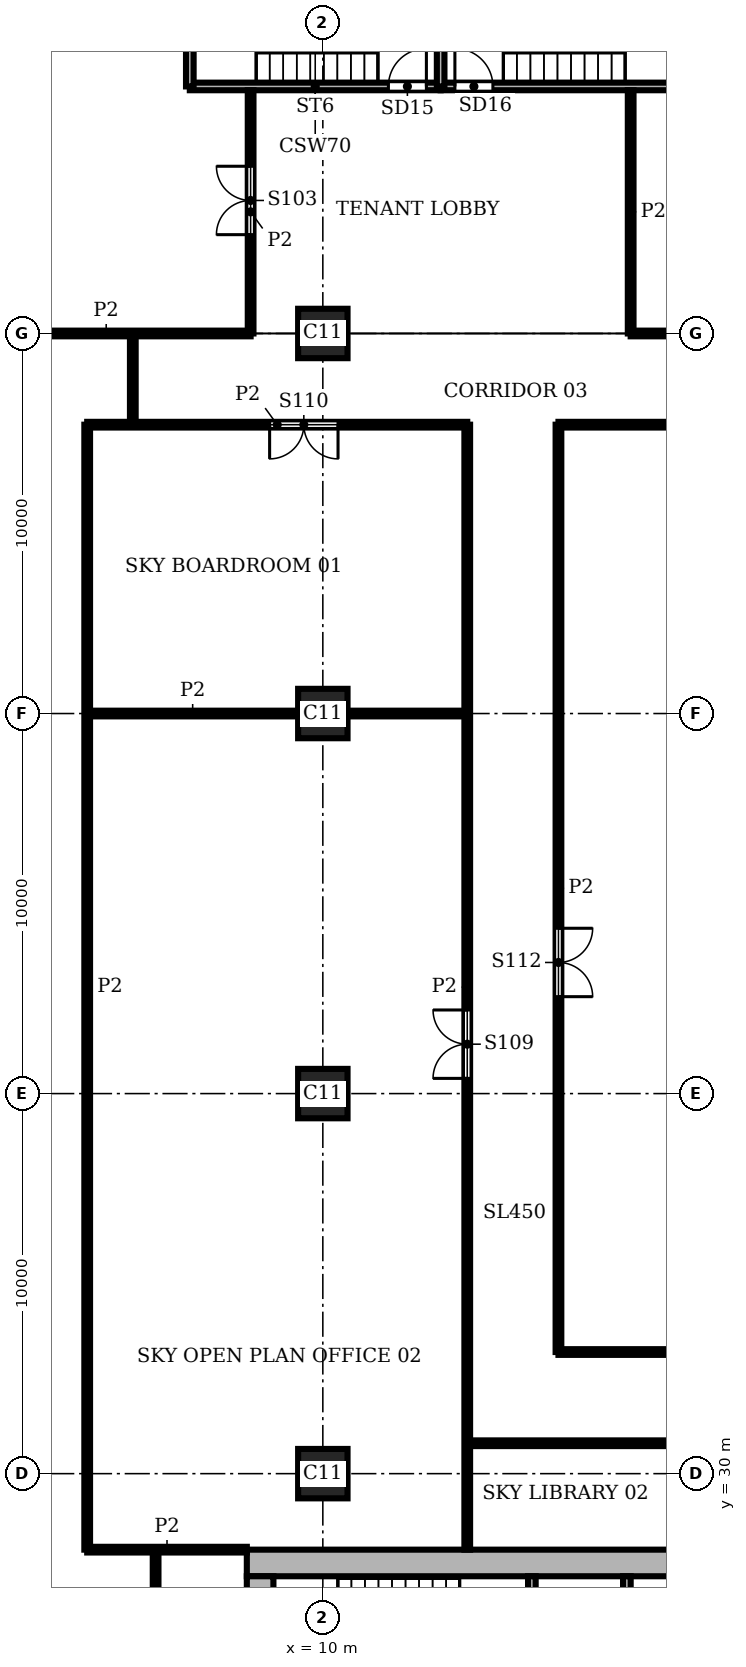
"""IFC4 building model, lengths in metres.
Left out: names, types, materials, properties, quantities, classifications, styles, units other than length and angle.
Written with IfcOpenShell. Run it as: python <this file> out.ifc"""

import sys

from ifc_helpers import new_model, si_unit, direction, frame, frame_2d, origin, origin_2d, place, context, subcontext, project, spatial, rectangle, extrude, element, fill, save


model = new_model("IFC4")
c1 = context("Model", 3, precision=1e-05, world=origin(), true_north=direction((0.0, 1.0)))
c2 = subcontext(c1, "Body", "Model", "MODEL_VIEW")
j1 = project(units=[si_unit("LENGTHUNIT", "METRE"), si_unit("PLANEANGLEUNIT", "RADIAN")], contexts=[c1])
p1 = place(None, origin())
s1 = spatial("IfcSite", under=j1, at=p1, CompositionType="ELEMENT")
p2 = place(p1, origin())
s2 = spatial("IfcBuilding", under=s1, at=p2, CompositionType="ELEMENT")
p3 = place(p2, frame((0.0, 0.0, 126.3)))
s3 = spatial("IfcBuildingStorey", under=s2, at=p3, CompositionType="ELEMENT", Elevation=126.3)
for number, where, z_axis, x_axis in (
    (1, (10.0, 30.0, 0.0), (0.0, 0.0, 1.0), (1.0, 0.0, 0.0)),
    (2, (10.0, 40.0, 0.0), (0.0, 0.0, 1.0), (1.0, 0.0, 0.0)),
    (3, (10.0, 50.0, 0.0), (0.0, 0.0, 1.0), (1.0, 0.0, 0.0)),
    (4, (10.0, 60.0, 0.0), (0.0, 0.0, 1.0), (1.0, 0.0, 0.0)),
):
    element("IfcColumn", number, at=place(p3, frame(where, z_axis=z_axis, x_axis=x_axis)), inside=s3, PredefinedType="COLUMN", context=c2, shape_type="SweptSolid", body=[
        extrude(rectangle(XDim=1.3, YDim=1.3, at=origin_2d()), origin(), (0.0, 0.0, 1.0), 5.4),
    ])
p4 = place(p3, frame((28.0, 27.65, 0.0), z_axis=(0.0, 0.0, 1.0), x_axis=(-1.0, 0.0, 0.0)))
e5 = element("IfcWall", 5, at=p4, inside=s3, PredefinedType="SHEAR", context=c2, shape_type="SweptSolid", body=[
    extrude(rectangle(XDim=20.0, YDim=0.7, at=frame_2d((10.0, 0.0))), origin(), (0.0, 0.0, 1.0), 5.4),
])
p5 = place(p3, frame((8.35, 27.3, 0.0), z_axis=(0.0, 0.0, 1.0), x_axis=(0.0, -1.0, 0.0)))
e6 = element("IfcWall", 6, at=p5, inside=s3, PredefinedType="SHEAR", context=c2, shape_type="SweptSolid", body=[
    extrude(rectangle(XDim=18.6, YDim=0.7, at=frame_2d((9.3, 0.0))), origin(), (0.0, 0.0, 1.0), 5.4),
])
p6 = place(p3, frame((3.284, 70.386, 0.0), z_axis=(0.0, 0.0, 1.0), x_axis=(-0.555541552266, -0.831488775454, 0.0)))
e7 = element("IfcWall", 7, at=p6, inside=s3, PredefinedType="SOLIDWALL", context=c2, shape_type="SweptSolid", body=[
    extrude(rectangle(XDim=4.753, YDim=0.4, at=frame_2d((2.376, 0.0))), origin(), (0.0, 0.0, 1.0), 5.4),
])
p7 = place(p6, frame((0.226, 0.0, 0.9)))
e8 = element("IfcOpeningElement", 8, at=p7, cuts=e7, PredefinedType="OPENING", context=c2, shape_type="SweptSolid", body=[
    extrude(rectangle(XDim=4.3, YDim=3.4, at=frame_2d((2.15, 1.7))), frame((0.0, 0.21, 0.0), z_axis=(0.0, -1.0, 0.0), x_axis=(1.0, 0.0, 0.0)), (0.0, 0.0, 1.0), 0.42),
])
p8 = place(p3, frame((6.5, 66.5, 0.0), z_axis=(0.0, 0.0, 1.0), x_axis=(1.0, 0.0, 0.0)))
e9 = element("IfcWall", 9, at=p8, inside=s3, PredefinedType="SHEAR", context=c2, shape_type="SweptSolid", body=[
    extrude(rectangle(XDim=6.6, YDim=0.2, at=frame_2d((3.3, 0.0))), origin(), (0.0, 0.0, 1.0), 5.08),
])
p9 = place(p8, frame((5.225, 0.0, 0.0)))
e10 = element("IfcOpeningElement", 10, at=p9, cuts=e9, PredefinedType="OPENING", context=c2, shape_type="SweptSolid", body=[
    extrude(rectangle(XDim=1.0, YDim=2.1, at=frame_2d((0.5, 1.05))), frame((0.0, 0.11, 0.0), z_axis=(0.0, -1.0, 0.0), x_axis=(1.0, 0.0, 0.0)), (0.0, 0.0, 1.0), 0.22),
])
p10 = place(p3, frame((13.1, 66.5, 0.0), z_axis=(0.0, 0.0, 1.0), x_axis=(1.0, 0.0, 0.0)))
e11 = element("IfcWall", 11, at=p10, inside=s3, PredefinedType="SHEAR", context=c2, shape_type="SweptSolid", body=[
    extrude(rectangle(XDim=6.6, YDim=0.2, at=frame_2d((3.3, 0.0))), origin(), (0.0, 0.0, 1.0), 5.08),
])
p11 = place(p10, frame((0.375, 0.0, 0.0)))
e12 = element("IfcOpeningElement", 12, at=p11, cuts=e11, PredefinedType="OPENING", context=c2, shape_type="SweptSolid", body=[
    extrude(rectangle(XDim=1.0, YDim=2.1, at=frame_2d((0.5, 1.05))), frame((0.0, 0.11, 0.0), z_axis=(0.0, -1.0, 0.0), x_axis=(1.0, 0.0, 0.0)), (0.0, 0.0, 1.0), 0.22),
])
for number, where, z_axis, x_axis in (
    (13, (6.5, 66.5, 0.0), (0.0, 0.0, 1.0), (0.0, 1.0, 0.0)),
    (14, (13.1, 66.5, 0.0), (0.0, 0.0, 1.0), (0.0, 1.0, 0.0)),
):
    element("IfcWall", number, at=place(p3, frame(where, z_axis=z_axis, x_axis=x_axis)), inside=s3, PredefinedType="SHEAR", context=c2, shape_type="SweptSolid", body=[
        extrude(rectangle(XDim=3.3, YDim=0.2, at=frame_2d((1.65, 0.0))), origin(), (0.0, 0.0, 1.0), 5.08),
    ])
p12 = place(p3, frame((15.5, 23.6, 0.0), z_axis=(0.0, 0.0, 1.0), x_axis=(0.0, 1.0, 0.0)))
e15 = element("IfcWall", 15, at=p12, inside=s3, PredefinedType="SHEAR", context=c2, shape_type="SweptSolid", body=[
    extrude(rectangle(XDim=3.7, YDim=0.2, at=frame_2d((1.85, 0.0))), origin(), (0.0, 0.0, 1.0), 5.08),
])
p13 = place(p3, frame((18.0, 20.0, 0.0), z_axis=(0.0, 0.0, 1.0), x_axis=(0.0, 1.0, 0.0)))
e16 = element("IfcWall", 16, at=p13, inside=s3, PredefinedType="SHEAR", context=c2, shape_type="SweptSolid", body=[
    extrude(rectangle(XDim=7.3, YDim=0.2, at=frame_2d((3.65, 0.0))), origin(), (0.0, 0.0, 1.0), 5.08),
])
p14 = place(p13, frame((1.2, 0.0, 0.0)))
e17 = element("IfcOpeningElement", 17, at=p14, cuts=e16, PredefinedType="OPENING", context=c2, shape_type="SweptSolid", body=[
    extrude(rectangle(XDim=1.2, YDim=2.1, at=frame_2d((0.6, 1.05))), frame((0.0, 0.11, 0.0), z_axis=(0.0, -1.0, 0.0), x_axis=(1.0, 0.0, 0.0)), (0.0, 0.0, 1.0), 0.22),
])
p15 = place(p3, frame((3.8, 28.0, 0.0), z_axis=(0.0, 0.0, 1.0), x_axis=(0.0, 1.0, 0.0)))
e18 = element("IfcWall", 18, at=p15, inside=s3, PredefinedType="PARTITIONING", context=c2, shape_type="SweptSolid", body=[
    extrude(rectangle(XDim=29.6, YDim=0.15, at=frame_2d((14.8, 0.0))), origin(), (0.0, 0.0, 1.0), 5.08),
])
p16 = place(p3, frame((5.0, 57.6, 0.0), z_axis=(0.0, 0.0, 1.0), x_axis=(0.0, 1.0, 0.0)))
e19 = element("IfcWall", 19, at=p16, inside=s3, PredefinedType="PARTITIONING", context=c2, shape_type="SweptSolid", body=[
    extrude(rectangle(XDim=2.4, YDim=0.15, at=frame_2d((1.2, 0.0))), origin(), (0.0, 0.0, 1.0), 5.08),
])
p17 = place(p3, frame((5.6, 5.6, 0.0), z_axis=(0.0, 0.0, 1.0), x_axis=(0.0, 1.0, 0.0)))
e20 = element("IfcWall", 20, at=p17, inside=s3, PredefinedType="PARTITIONING", context=c2, shape_type="SweptSolid", body=[
    extrude(rectangle(XDim=22.4, YDim=0.15, at=frame_2d((11.2, 0.0))), origin(), (0.0, 0.0, 1.0), 5.08),
])
p18 = place(p17, frame((4.35, 0.0, 0.0)))
e21 = element("IfcOpeningElement", 21, at=p18, cuts=e20, PredefinedType="OPENING", context=c2, shape_type="SweptSolid", body=[
    extrude(rectangle(XDim=1.0, YDim=2.1, at=frame_2d((0.5, 1.05))), frame((0.0, 0.085, 0.0), z_axis=(0.0, -1.0, 0.0), x_axis=(1.0, 0.0, 0.0)), (0.0, 0.0, 1.0), 0.17),
])
p19 = place(p17, frame((11.75, 0.0, 0.0)))
e22 = element("IfcOpeningElement", 22, at=p19, cuts=e20, PredefinedType="OPENING", context=c2, shape_type="SweptSolid", body=[
    extrude(rectangle(XDim=0.8, YDim=2.1, at=frame_2d((0.4, 1.05))), frame((0.0, 0.085, 0.0), z_axis=(0.0, -1.0, 0.0), x_axis=(1.0, 0.0, 0.0)), (0.0, 0.0, 1.0), 0.17),
])
p20 = place(p17, frame((17.0, 0.0, 0.0)))
e23 = element("IfcOpeningElement", 23, at=p20, cuts=e20, PredefinedType="OPENING", context=c2, shape_type="SweptSolid", body=[
    extrude(rectangle(XDim=1.8, YDim=2.1, at=frame_2d((0.9, 1.05))), frame((0.0, 0.085, 0.0), z_axis=(0.0, -1.0, 0.0), x_axis=(1.0, 0.0, 0.0)), (0.0, 0.0, 1.0), 0.17),
])
p21 = place(p3, frame((8.1, 60.0, 0.0), z_axis=(0.0, 0.0, 1.0), x_axis=(0.0, 1.0, 0.0)))
e24 = element("IfcWall", 24, at=p21, inside=s3, PredefinedType="PARTITIONING", context=c2, shape_type="SweptSolid", body=[
    extrude(rectangle(XDim=6.4, YDim=0.15, at=frame_2d((3.2, 0.0))), origin(), (0.0, 0.0, 1.0), 5.08),
])
p22 = place(p21, frame((2.6, 0.0, 0.0)))
e25 = element("IfcOpeningElement", 25, at=p22, cuts=e24, PredefinedType="OPENING", context=c2, shape_type="SweptSolid", body=[
    extrude(rectangle(XDim=1.8, YDim=2.1, at=frame_2d((0.9, 1.05))), frame((0.0, 0.085, 0.0), z_axis=(0.0, -1.0, 0.0), x_axis=(1.0, 0.0, 0.0)), (0.0, 0.0, 1.0), 0.17),
])
p23 = place(p3, frame((13.8, 28.0, 0.0), z_axis=(0.0, 0.0, 1.0), x_axis=(0.0, 1.0, 0.0)))
e26 = element("IfcWall", 26, at=p23, inside=s3, PredefinedType="PARTITIONING", context=c2, shape_type="SweptSolid", body=[
    extrude(rectangle(XDim=29.6, YDim=0.15, at=frame_2d((14.8, 0.0))), origin(), (0.0, 0.0, 1.0), 5.08),
])
p24 = place(p23, frame((12.4, 0.0, 0.0)))
e27 = element("IfcOpeningElement", 27, at=p24, cuts=e26, PredefinedType="OPENING", context=c2, shape_type="SweptSolid", body=[
    extrude(rectangle(XDim=1.8, YDim=2.1, at=frame_2d((0.9, 1.05))), frame((0.0, 0.085, 0.0), z_axis=(0.0, -1.0, 0.0), x_axis=(1.0, 0.0, 0.0)), (0.0, 0.0, 1.0), 0.17),
])
p25 = place(p3, frame((16.2, 33.2, 0.0), z_axis=(0.0, 0.0, 1.0), x_axis=(0.0, 1.0, 0.0)))
e28 = element("IfcWall", 28, at=p25, inside=s3, PredefinedType="PARTITIONING", context=c2, shape_type="SweptSolid", body=[
    extrude(rectangle(XDim=24.4, YDim=0.15, at=frame_2d((12.2, 0.0))), origin(), (0.0, 0.0, 1.0), 5.08),
])
p26 = place(p25, frame((9.35, 0.0, 0.0)))
e29 = element("IfcOpeningElement", 29, at=p26, cuts=e28, PredefinedType="OPENING", context=c2, shape_type="SweptSolid", body=[
    extrude(rectangle(XDim=1.8, YDim=2.1, at=frame_2d((0.9, 1.05))), frame((0.0, 0.085, 0.0), z_axis=(0.0, -1.0, 0.0), x_axis=(1.0, 0.0, 0.0)), (0.0, 0.0, 1.0), 0.17),
])
p27 = place(p3, frame((18.1, 60.0, 0.0), z_axis=(0.0, 0.0, 1.0), x_axis=(0.0, 1.0, 0.0)))
e30 = element("IfcWall", 30, at=p27, inside=s3, PredefinedType="PARTITIONING", context=c2, shape_type="SweptSolid", body=[
    extrude(rectangle(XDim=6.4, YDim=0.15, at=frame_2d((3.2, 0.0))), origin(), (0.0, 0.0, 1.0), 5.08),
])
p28 = place(p3, frame((3.8, 28.0, 0.0), z_axis=(0.0, 0.0, 1.0), x_axis=(1.0, 0.0, 0.0)))
e31 = element("IfcWall", 31, at=p28, inside=s3, PredefinedType="PARTITIONING", context=c2, shape_type="SweptSolid", body=[
    extrude(rectangle(XDim=4.2, YDim=0.15, at=frame_2d((2.1, 0.0))), origin(), (0.0, 0.0, 1.0), 5.08),
])
p29 = place(p3, frame((13.802, 30.8, 0.0), z_axis=(0.0, 0.0, 1.0), x_axis=(1.0, 0.0, 0.0)))
e32 = element("IfcWall", 32, at=p29, inside=s3, PredefinedType="PARTITIONING", context=c2, shape_type="SweptSolid", body=[
    extrude(rectangle(XDim=16.798, YDim=0.15, at=frame_2d((8.399, 0.0))), origin(), (0.0, 0.0, 1.0), 5.08),
])
p30 = place(p29, frame((8.35, 0.0, 0.0)))
e33 = element("IfcOpeningElement", 33, at=p30, cuts=e32, PredefinedType="OPENING", context=c2, shape_type="SweptSolid", body=[
    extrude(rectangle(XDim=1.0, YDim=2.1, at=frame_2d((0.5, 1.05))), frame((0.0, 0.085, 0.0), z_axis=(0.0, -1.0, 0.0), x_axis=(1.0, 0.0, 0.0)), (0.0, 0.0, 1.0), 0.17),
])
p31 = place(p3, frame((16.2, 33.2, 0.0), z_axis=(0.0, 0.0, 1.0), x_axis=(1.0, 0.0, 0.0)))
e34 = element("IfcWall", 34, at=p31, inside=s3, PredefinedType="PARTITIONING", context=c2, shape_type="SweptSolid", body=[
    extrude(rectangle(XDim=16.269, YDim=0.15, at=frame_2d((8.135, 0.0))), origin(), (0.0, 0.0, 1.0), 5.08),
])
p32 = place(p3, frame((3.8, 50.0, 0.0), z_axis=(0.0, 0.0, 1.0), x_axis=(1.0, 0.0, 0.0)))
e35 = element("IfcWall", 35, at=p32, inside=s3, PredefinedType="PARTITIONING", context=c2, shape_type="SweptSolid", body=[
    extrude(rectangle(XDim=5.55, YDim=0.15, at=frame_2d((2.775, 0.0))), origin(), (0.0, 0.0, 1.0), 5.08),
])
p33 = place(p3, frame((10.65, 50.0, 0.0), z_axis=(0.0, 0.0, 1.0), x_axis=(1.0, 0.0, 0.0)))
e36 = element("IfcWall", 36, at=p33, inside=s3, PredefinedType="PARTITIONING", context=c2, shape_type="SweptSolid", body=[
    extrude(rectangle(XDim=3.15, YDim=0.15, at=frame_2d((1.575, 0.0))), origin(), (0.0, 0.0, 1.0), 5.08),
])
p34 = place(p3, frame((3.8, 57.6, 0.0), z_axis=(0.0, 0.0, 1.0), x_axis=(1.0, 0.0, 0.0)))
e37 = element("IfcWall", 37, at=p34, inside=s3, PredefinedType="PARTITIONING", context=c2, shape_type="SweptSolid", body=[
    extrude(rectangle(XDim=10.0, YDim=0.15, at=frame_2d((5.0, 0.0))), origin(), (0.0, 0.0, 1.0), 5.08),
])
p35 = place(p34, frame((4.8, 0.0, 0.0)))
e38 = element("IfcOpeningElement", 38, at=p35, cuts=e37, PredefinedType="OPENING", context=c2, shape_type="SweptSolid", body=[
    extrude(rectangle(XDim=1.8, YDim=2.1, at=frame_2d((0.9, 1.05))), frame((0.0, 0.085, 0.0), z_axis=(0.0, -1.0, 0.0), x_axis=(1.0, 0.0, 0.0)), (0.0, 0.0, 1.0), 0.17),
])
p36 = place(p3, frame((16.2, 57.6, 0.0), z_axis=(0.0, 0.0, 1.0), x_axis=(1.0, 0.0, 0.0)))
e39 = element("IfcWall", 39, at=p36, inside=s3, PredefinedType="PARTITIONING", context=c2, shape_type="SweptSolid", body=[
    extrude(rectangle(XDim=8.8, YDim=0.15, at=frame_2d((4.4, 0.0))), origin(), (0.0, 0.0, 1.0), 5.08),
])
p37 = place(p3, frame((0.5, 60.0, 0.0), z_axis=(0.0, 0.0, 1.0), x_axis=(1.0, 0.0, 0.0)))
e40 = element("IfcWall", 40, at=p37, inside=s3, PredefinedType="PARTITIONING", context=c2, shape_type="SweptSolid", body=[
    extrude(rectangle(XDim=7.6, YDim=0.15, at=frame_2d((3.8, 0.0))), origin(), (0.0, 0.0, 1.0), 5.08),
])
p38 = place(p3, frame((18.1, 60.0, 0.0), z_axis=(0.0, 0.0, 1.0), x_axis=(1.0, 0.0, 0.0)))
e41 = element("IfcWall", 41, at=p38, inside=s3, PredefinedType="PARTITIONING", context=c2, shape_type="SweptSolid", body=[
    extrude(rectangle(XDim=1.25, YDim=0.15, at=frame_2d((0.625, 0.0))), origin(), (0.0, 0.0, 1.0), 5.08),
])
p39 = place(p7, origin())
e42 = element("IfcWindow", 42, at=p39, inside=s3, PartitioningType="SINGLE_PANEL", PredefinedType="WINDOW", context=c2, shape_type="SweptSolid", body=[
    extrude(rectangle(XDim=4.3, YDim=3.4, at=frame_2d((2.15, 1.7))), frame((0.0, 0.16, 0.0), z_axis=(0.0, -1.0, 0.0), x_axis=(1.0, 0.0, 0.0)), (0.0, 0.0, 1.0), 0.06),
])
fill(e8, e42)
p40 = place(p9, origin())
e43 = element("IfcDoor", 43, at=p40, inside=s3, OperationType="SINGLE_SWING_RIGHT", PredefinedType="DOOR", context=c2, shape_type="SweptSolid", body=[
    extrude(rectangle(XDim=1.0, YDim=2.1, at=frame_2d((0.5, 1.05))), frame((0.0, 0.025, 0.0), z_axis=(0.0, -1.0, 0.0), x_axis=(1.0, 0.0, 0.0)), (0.0, 0.0, 1.0), 0.05),
])
fill(e10, e43)
p41 = place(p11, origin())
e44 = element("IfcDoor", 44, at=p41, inside=s3, OperationType="SINGLE_SWING_LEFT", PredefinedType="DOOR", context=c2, shape_type="SweptSolid", body=[
    extrude(rectangle(XDim=1.0, YDim=2.1, at=frame_2d((0.5, 1.05))), frame((0.0, 0.025, 0.0), z_axis=(0.0, -1.0, 0.0), x_axis=(1.0, 0.0, 0.0)), (0.0, 0.0, 1.0), 0.05),
])
fill(e12, e44)
p42 = place(p22, origin())
e45 = element("IfcDoor", 45, at=p42, inside=s3, OperationType="DOUBLE_DOOR_SINGLE_SWING", PredefinedType="DOOR", context=c2, shape_type="SweptSolid", body=[
    extrude(rectangle(XDim=1.8, YDim=2.1, at=frame_2d((0.9, 1.05))), frame((0.0, 0.025, 0.0), z_axis=(0.0, -1.0, 0.0), x_axis=(1.0, 0.0, 0.0)), (0.0, 0.0, 1.0), 0.05),
])
fill(e25, e45)
p43 = place(p24, origin())
e46 = element("IfcDoor", 46, at=p43, inside=s3, OperationType="DOUBLE_DOOR_SINGLE_SWING", PredefinedType="DOOR", context=c2, shape_type="SweptSolid", body=[
    extrude(rectangle(XDim=1.8, YDim=2.1, at=frame_2d((0.9, 1.05))), frame((0.0, 0.025, 0.0), z_axis=(0.0, -1.0, 0.0), x_axis=(1.0, 0.0, 0.0)), (0.0, 0.0, 1.0), 0.05),
])
fill(e27, e46)
p44 = place(p35, frame((1.8, 0.0, 0.0), z_axis=(0.0, 0.0, 1.0), x_axis=(-1.0, 0.0, 0.0)))
e47 = element("IfcDoor", 47, at=p44, inside=s3, OperationType="DOUBLE_DOOR_SINGLE_SWING", PredefinedType="DOOR", context=c2, shape_type="SweptSolid", body=[
    extrude(rectangle(XDim=1.8, YDim=2.1, at=frame_2d((0.9, 1.05))), frame((0.0, 0.025, 0.0), z_axis=(0.0, -1.0, 0.0), x_axis=(1.0, 0.0, 0.0)), (0.0, 0.0, 1.0), 0.05),
])
fill(e38, e47)
p45 = place(p26, frame((1.8, 0.0, 0.0), z_axis=(0.0, 0.0, 1.0), x_axis=(-1.0, 0.0, 0.0)))
e48 = element("IfcDoor", 48, at=p45, inside=s3, OperationType="DOUBLE_DOOR_SINGLE_SWING", PredefinedType="DOOR", context=c2, shape_type="SweptSolid", body=[
    extrude(rectangle(XDim=1.8, YDim=2.1, at=frame_2d((0.9, 1.05))), frame((0.0, 0.025, 0.0), z_axis=(0.0, -1.0, 0.0), x_axis=(1.0, 0.0, 0.0)), (0.0, 0.0, 1.0), 0.05),
])
fill(e29, e48)
save(model, sys.argv[1])
